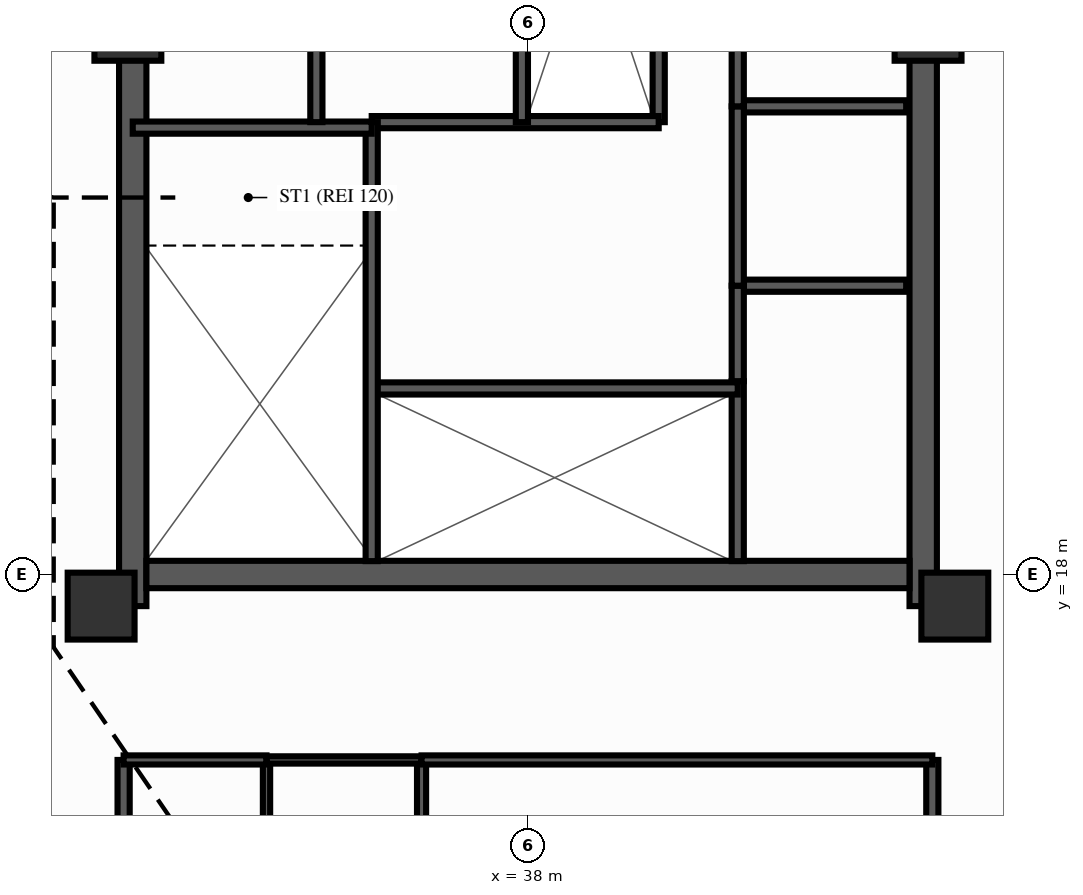
"""IFC4 building model, lengths in metres.
Left out: names, types, materials, properties, quantities, classifications, styles, units other than length and angle.
Written with IfcOpenShell. Run it as: python <this file> out.ifc"""

import sys

from ifc_helpers import new_model, si_unit, direction, frame, frame_2d, origin, origin_2d, place, context, subcontext, project, spatial, rectangle, extrude, source, transform, mapped, element, fill, save


model = new_model("IFC4")
c1 = context("Model", 3, precision=1e-05, world=origin(), true_north=direction((0.0, 1.0)))
c2 = subcontext(c1, "Body", "Model", "MODEL_VIEW")
j1 = project(units=[si_unit("LENGTHUNIT", "METRE"), si_unit("PLANEANGLEUNIT", "RADIAN")], contexts=[c1])
p1 = place(None, origin())
s1 = spatial("IfcSite", under=j1, at=p1, CompositionType="ELEMENT")
p2 = place(p1, origin())
s2 = spatial("IfcBuilding", under=s1, at=p2, CompositionType="ELEMENT")
p3 = place(p2, frame((0.0, 0.0, 148.7)))
s3 = spatial("IfcBuildingStorey", under=s2, at=p3, CompositionType="ELEMENT", Elevation=148.7)
p4 = place(p3, frame((31.5, 17.48, 0.0), z_axis=(0.0, 0.0, 1.0), x_axis=(0.0, 1.0, 0.0)))
e1 = element("IfcWall", 1, at=p4, inside=s3, PredefinedType="SHEAR", context=c2, shape_type="SweptSolid", body=[
    extrude(rectangle(XDim=19.04, YDim=0.45, at=frame_2d((9.52, 0.0))), origin(), (0.0, 0.0, 1.0), 3.5),
])
p5 = place(p4, frame((6.32, 0.0, 0.0)))
e2 = element("IfcOpeningElement", 2, at=p5, cuts=e1, PredefinedType="OPENING", context=c2, shape_type="SweptSolid", body=[
    extrude(rectangle(XDim=1.1, YDim=2.15, at=frame_2d((0.55, 1.075))), frame((0.0, 0.237, 0.0), z_axis=(0.0, -1.0, 0.0), x_axis=(1.0, 0.0, 0.0)), (0.0, 0.0, 1.0), 0.474),
])
p6 = place(p3, frame((44.5, 17.48, 0.0), z_axis=(0.0, 0.0, 1.0), x_axis=(0.0, 1.0, 0.0)))
e3 = element("IfcWall", 3, at=p6, inside=s3, PredefinedType="SHEAR", context=c2, shape_type="SweptSolid", body=[
    extrude(rectangle(XDim=19.04, YDim=0.45, at=frame_2d((9.52, 0.0))), origin(), (0.0, 0.0, 1.0), 3.5),
])
p7 = place(p6, frame((12.67, 0.0, 0.0), z_axis=(0.0, 0.0, 1.0), x_axis=(-1.0, 0.0, 0.0)))
e4 = element("IfcOpeningElement", 4, at=p7, cuts=e3, PredefinedType="OPENING", context=c2, shape_type="SweptSolid", body=[
    extrude(rectangle(XDim=1.1, YDim=2.15, at=frame_2d((0.55, 1.075))), frame((0.0, 0.237, 0.0), z_axis=(0.0, -1.0, 0.0), x_axis=(1.0, 0.0, 0.0)), (0.0, 0.0, 1.0), 0.474),
])
p8 = place(p3, frame((31.725, 18.0, 0.0), z_axis=(0.0, 0.0, 1.0), x_axis=(1.0, 0.0, 0.0)))
e5 = element("IfcWall", 5, at=p8, inside=s3, PredefinedType="SHEAR", context=c2, shape_type="SweptSolid", body=[
    extrude(rectangle(XDim=12.55, YDim=0.45, at=frame_2d((6.275, 0.0))), origin(), (0.0, 0.0, 1.0), 3.5),
])
m1 = source(origin(), c2, "Body", "SweptSolid", [
    extrude(rectangle(XDim=1.1, YDim=1.1, at=origin_2d()), origin(), (0.0, 0.0, 1.0), 3.5),
])
for number, where, z_axis, x_axis in (
    (6, (30.98, 17.48, 0.0), (0.0, 0.0, 1.0), (1.0, 0.0, 0.0)),
    (7, (45.02, 17.48, 0.0), (0.0, 0.0, 1.0), (1.0, 0.0, 0.0)),
    (8, (31.42, 27.0, 0.0), (0.0, 0.0, 1.0), (1.0, 0.0, 0.0)),
    (9, (44.58, 27.0, 0.0), (0.0, 0.0, 1.0), (1.0, 0.0, 0.0)),
):
    element("IfcColumn", number, at=place(p3, frame(where, z_axis=z_axis, x_axis=x_axis)), inside=s3, PredefinedType="COLUMN", context=c2, shape_type="MappedRepresentation", body=[
        mapped(m1, transform((0.0, 0.0, 0.0), scale=1.0)),
    ])
p9 = place(p3, frame((41.55, 22.75, 0.0), z_axis=(0.0, 0.0, 1.0), x_axis=(1.0, 0.0, 0.0)))
e10 = element("IfcWall", 10, at=p9, inside=s3, PredefinedType="PARTITIONING", context=c2, shape_type="SweptSolid", body=[
    extrude(rectangle(XDim=2.67, YDim=0.2, at=frame_2d((1.335, 0.0))), origin(), (0.0, 0.0, 1.0), 3.16),
])
p10 = place(p3, frame((41.55, 25.7, 0.0), z_axis=(0.0, 0.0, 1.0), x_axis=(1.0, 0.0, 0.0)))
e11 = element("IfcWall", 11, at=p10, inside=s3, PredefinedType="PARTITIONING", context=c2, shape_type="SweptSolid", body=[
    extrude(rectangle(XDim=2.67, YDim=0.2, at=frame_2d((1.335, 0.0))), origin(), (0.0, 0.0, 1.0), 2.64),
])
p11 = place(p3, frame((41.45, 18.22, 0.0), z_axis=(0.0, 0.0, 1.0), x_axis=(0.0, 1.0, 0.0)))
e12 = element("IfcWall", 12, at=p11, inside=s3, PredefinedType="PARTITIONING", context=c2, shape_type="SweptSolid", body=[
    extrude(rectangle(XDim=2.96, YDim=0.2, at=frame_2d((1.48, 0.0))), origin(), (0.0, 0.0, 1.0), 3.16),
])
p12 = place(p3, frame((41.45, 21.18, 0.0), z_axis=(0.0, 0.0, 1.0), x_axis=(0.0, 1.0, 0.0)))
e13 = element("IfcWall", 13, at=p12, inside=s3, PredefinedType="PARTITIONING", context=c2, shape_type="SweptSolid", body=[
    extrude(rectangle(XDim=1.57, YDim=0.2, at=frame_2d((0.785, 0.0))), origin(), (0.0, 0.0, 1.0), 3.16),
])
p13 = place(p12, frame((0.38, 0.0, 0.0)))
e14 = element("IfcOpeningElement", 14, at=p13, cuts=e13, PredefinedType="OPENING", context=c2, shape_type="SweptSolid", body=[
    extrude(rectangle(XDim=0.8, YDim=2.05, at=frame_2d((0.4, 1.025))), frame((0.0, 0.112, 0.0), z_axis=(0.0, -1.0, 0.0), x_axis=(1.0, 0.0, 0.0)), (0.0, 0.0, 1.0), 0.224),
])
p14 = place(p3, frame((41.45, 22.75, 0.0), z_axis=(0.0, 0.0, 1.0), x_axis=(0.0, 1.0, 0.0)))
e15 = element("IfcWall", 15, at=p14, inside=s3, PredefinedType="PARTITIONING", context=c2, shape_type="SweptSolid", body=[
    extrude(rectangle(XDim=2.95, YDim=0.2, at=frame_2d((1.475, 0.0))), origin(), (0.0, 0.0, 1.0), 3.16),
])
p15 = place(p14, frame((1.05, 0.0, 0.0)))
e16 = element("IfcOpeningElement", 16, at=p15, cuts=e15, PredefinedType="OPENING", context=c2, shape_type="SweptSolid", body=[
    extrude(rectangle(XDim=0.8, YDim=2.05, at=frame_2d((0.4, 1.025))), frame((0.0, 0.112, 0.0), z_axis=(0.0, -1.0, 0.0), x_axis=(1.0, 0.0, 0.0)), (0.0, 0.0, 1.0), 0.224),
])
p16 = place(p3, frame((41.45, 25.7, 0.0), z_axis=(0.0, 0.0, 1.0), x_axis=(0.0, 1.0, 0.0)))
e17 = element("IfcWall", 17, at=p16, inside=s3, PredefinedType="PARTITIONING", context=c2, shape_type="SweptSolid", body=[
    extrude(rectangle(XDim=2.9, YDim=0.2, at=frame_2d((1.45, 0.0))), origin(), (0.0, 0.0, 1.0), 3.16),
])
p17 = place(p16, frame((1.0, 0.0, 0.0)))
e18 = element("IfcOpeningElement", 18, at=p17, cuts=e17, PredefinedType="OPENING", context=c2, shape_type="SweptSolid", body=[
    extrude(rectangle(XDim=0.9, YDim=2.1, at=frame_2d((0.45, 1.05))), frame((0.0, 0.112, 0.0), z_axis=(0.0, -1.0, 0.0), x_axis=(1.0, 0.0, 0.0)), (0.0, 0.0, 1.0), 0.224),
])
p18 = place(p3, frame((40.15, 25.44, 0.0), z_axis=(0.0, 0.0, 1.0), x_axis=(0.0, 1.0, 0.0)))
e19 = element("IfcWall", 19, at=p18, inside=s3, PredefinedType="PARTITIONING", context=c2, shape_type="SweptSolid", body=[
    extrude(rectangle(XDim=6.36, YDim=0.2, at=frame_2d((3.18, 0.0))), origin(), (0.0, 0.0, 1.0), 3.16),
])
p19 = place(p3, frame((35.43, 21.06, 0.0), z_axis=(0.0, 0.0, 1.0), x_axis=(1.0, 0.0, 0.0)))
e20 = element("IfcWall", 20, at=p19, inside=s3, PredefinedType="PARTITIONING", context=c2, shape_type="SweptSolid", body=[
    extrude(rectangle(XDim=6.02, YDim=0.2, at=frame_2d((3.01, 0.0))), origin(), (0.0, 0.0, 1.0), 3.16),
])
p20 = place(p19, frame((1.0, 0.0, 0.0)))
e21 = element("IfcOpeningElement", 21, at=p20, cuts=e20, PredefinedType="OPENING", context=c2, shape_type="SweptSolid", body=[
    extrude(rectangle(XDim=1.1, YDim=2.15, at=frame_2d((0.55, 1.075))), frame((0.0, 0.112, 0.0), z_axis=(0.0, -1.0, 0.0), x_axis=(1.0, 0.0, 0.0)), (0.0, 0.0, 1.0), 0.224),
])
p21 = place(p19, frame((2.95, 0.0, 0.0)))
e22 = element("IfcOpeningElement", 22, at=p21, cuts=e20, PredefinedType="OPENING", context=c2, shape_type="SweptSolid", body=[
    extrude(rectangle(XDim=1.1, YDim=2.15, at=frame_2d((0.55, 1.075))), frame((0.0, 0.112, 0.0), z_axis=(0.0, -1.0, 0.0), x_axis=(1.0, 0.0, 0.0)), (0.0, 0.0, 1.0), 0.224),
])
p22 = place(p19, frame((4.58, 0.0, 0.0)))
e23 = element("IfcOpeningElement", 23, at=p22, cuts=e20, PredefinedType="OPENING", context=c2, shape_type="SweptSolid", body=[
    extrude(rectangle(XDim=1.2, YDim=2.15, at=frame_2d((0.6, 1.075))), frame((0.0, 0.112, 0.0), z_axis=(0.0, -1.0, 0.0), x_axis=(1.0, 0.0, 0.0)), (0.0, 0.0, 1.0), 0.224),
])
p23 = place(p3, frame((35.43, 25.44, 0.0), z_axis=(0.0, 0.0, 1.0), x_axis=(1.0, 0.0, 0.0)))
e24 = element("IfcWall", 24, at=p23, inside=s3, PredefinedType="PARTITIONING", context=c2, shape_type="SweptSolid", body=[
    extrude(rectangle(XDim=4.72, YDim=0.2, at=frame_2d((2.36, 0.0))), origin(), (0.0, 0.0, 1.0), 3.16),
])
p24 = place(p23, frame((1.25, 0.0, 0.0)))
e25 = element("IfcOpeningElement", 25, at=p24, cuts=e24, PredefinedType="OPENING", context=c2, shape_type="SweptSolid", body=[
    extrude(rectangle(XDim=1.1, YDim=2.15, at=frame_2d((0.55, 1.075))), frame((0.0, 0.112, 0.0), z_axis=(0.0, -1.0, 0.0), x_axis=(1.0, 0.0, 0.0)), (0.0, 0.0, 1.0), 0.224),
])
p25 = place(p3, frame((35.43, 18.22, 0.0), z_axis=(0.0, 0.0, 1.0), x_axis=(0.0, 1.0, 0.0)))
e26 = element("IfcWall", 26, at=p25, inside=s3, PredefinedType="SOLIDWALL", context=c2, shape_type="SweptSolid", body=[
    extrude(rectangle(XDim=7.22, YDim=0.2, at=frame_2d((3.61, 0.0))), origin(), (0.0, 0.0, 1.0), 3.29),
])
p26 = place(p25, frame((6.68, 0.0, 0.0), z_axis=(0.0, 0.0, 1.0), x_axis=(-1.0, 0.0, 0.0)))
e27 = element("IfcOpeningElement", 27, at=p26, cuts=e26, PredefinedType="OPENING", context=c2, shape_type="SweptSolid", body=[
    extrude(rectangle(XDim=1.1, YDim=2.15, at=frame_2d((0.55, 1.075))), frame((0.0, 0.112, 0.0), z_axis=(0.0, -1.0, 0.0), x_axis=(1.0, 0.0, 0.0)), (0.0, 0.0, 1.0), 0.224),
])
p27 = place(p3, frame((31.5, 25.35, 0.0), z_axis=(0.0, 0.0, 1.0), x_axis=(1.0, 0.0, 0.0)))
e28 = element("IfcWall", 28, at=p27, inside=s3, PredefinedType="SOLIDWALL", context=c2, shape_type="SweptSolid", body=[
    extrude(rectangle(XDim=3.93, YDim=0.2, at=frame_2d((1.965, 0.0))), origin(), (0.0, 0.0, 1.0), 3.29),
])
p28 = place(p3, frame((34.52, 25.44, 0.0), z_axis=(0.0, 0.0, 1.0), x_axis=(0.0, 1.0, 0.0)))
e29 = element("IfcWall", 29, at=p28, inside=s3, PredefinedType="PARTITIONING", context=c2, shape_type="SweptSolid", body=[
    extrude(rectangle(XDim=10.34, YDim=0.2, at=frame_2d((5.17, 0.0))), origin(), (0.0, 0.0, 1.0), 3.16),
])
p29 = place(p28, frame((1.15, 0.0, 0.0)))
e30 = element("IfcOpeningElement", 30, at=p29, cuts=e29, PredefinedType="OPENING", context=c2, shape_type="SweptSolid", body=[
    extrude(rectangle(XDim=0.9, YDim=2.1, at=frame_2d((0.45, 1.05))), frame((0.0, 0.112, 0.0), z_axis=(0.0, -1.0, 0.0), x_axis=(1.0, 0.0, 0.0)), (0.0, 0.0, 1.0), 0.224),
])
p30 = place(p28, frame((4.35, 0.0, 0.0)))
e31 = element("IfcOpeningElement", 31, at=p30, cuts=e29, PredefinedType="OPENING", context=c2, shape_type="SweptSolid", body=[
    extrude(rectangle(XDim=0.9, YDim=2.1, at=frame_2d((0.45, 1.05))), frame((0.0, 0.112, 0.0), z_axis=(0.0, -1.0, 0.0), x_axis=(1.0, 0.0, 0.0)), (0.0, 0.0, 1.0), 0.224),
])
p31 = place(p28, frame((7.01, 0.0, 0.0)))
e32 = element("IfcOpeningElement", 32, at=p31, cuts=e29, PredefinedType="OPENING", context=c2, shape_type="SweptSolid", body=[
    extrude(rectangle(XDim=1.0, YDim=2.15, at=frame_2d((0.5, 1.075))), frame((0.0, 0.112, 0.0), z_axis=(0.0, -1.0, 0.0), x_axis=(1.0, 0.0, 0.0)), (0.0, 0.0, 1.0), 0.224),
])
p32 = place(p28, frame((8.76, 0.0, 0.0)))
e33 = element("IfcOpeningElement", 33, at=p32, cuts=e29, PredefinedType="OPENING", context=c2, shape_type="SweptSolid", body=[
    extrude(rectangle(XDim=1.0, YDim=2.15, at=frame_2d((0.5, 1.075))), frame((0.0, 0.112, 0.0), z_axis=(0.0, -1.0, 0.0), x_axis=(1.0, 0.0, 0.0)), (0.0, 0.0, 1.0), 0.224),
])
p33 = place(p3, frame((37.9, 25.44, 0.0), z_axis=(0.0, 0.0, 1.0), x_axis=(0.0, 1.0, 0.0)))
e34 = element("IfcWall", 34, at=p33, inside=s3, PredefinedType="PARTITIONING", context=c2, shape_type="SweptSolid", body=[
    extrude(rectangle(XDim=10.34, YDim=0.2, at=frame_2d((5.17, 0.0))), origin(), (0.0, 0.0, 1.0), 3.16),
])
p34 = place(p33, frame((0.32, 0.0, 0.0)))
e35 = element("IfcOpeningElement", 35, at=p34, cuts=e34, PredefinedType="OPENING", context=c2, shape_type="SweptSolid", body=[
    extrude(rectangle(XDim=1.0, YDim=2.15, at=frame_2d((0.5, 1.075))), frame((0.0, 0.112, 0.0), z_axis=(0.0, -1.0, 0.0), x_axis=(1.0, 0.0, 0.0)), (0.0, 0.0, 1.0), 0.224),
])
p35 = place(p33, frame((1.71, 0.0, 0.0)))
e36 = element("IfcOpeningElement", 36, at=p35, cuts=e34, PredefinedType="OPENING", context=c2, shape_type="SweptSolid", body=[
    extrude(rectangle(XDim=1.0, YDim=2.15, at=frame_2d((0.5, 1.075))), frame((0.0, 0.112, 0.0), z_axis=(0.0, -1.0, 0.0), x_axis=(1.0, 0.0, 0.0)), (0.0, 0.0, 1.0), 0.224),
])
p36 = place(p33, frame((3.51, 0.0, 0.0)))
e37 = element("IfcOpeningElement", 37, at=p36, cuts=e34, PredefinedType="OPENING", context=c2, shape_type="SweptSolid", body=[
    extrude(rectangle(XDim=1.0, YDim=2.15, at=frame_2d((0.5, 1.075))), frame((0.0, 0.112, 0.0), z_axis=(0.0, -1.0, 0.0), x_axis=(1.0, 0.0, 0.0)), (0.0, 0.0, 1.0), 0.224),
])
p37 = place(p33, frame((5.01, 0.0, 0.0)))
e38 = element("IfcOpeningElement", 38, at=p37, cuts=e34, PredefinedType="OPENING", context=c2, shape_type="SweptSolid", body=[
    extrude(rectangle(XDim=1.0, YDim=2.15, at=frame_2d((0.5, 1.075))), frame((0.0, 0.112, 0.0), z_axis=(0.0, -1.0, 0.0), x_axis=(1.0, 0.0, 0.0)), (0.0, 0.0, 1.0), 0.224),
])
p38 = place(p33, frame((6.86, 0.0, 0.0)))
e39 = element("IfcOpeningElement", 39, at=p38, cuts=e34, PredefinedType="OPENING", context=c2, shape_type="SweptSolid", body=[
    extrude(rectangle(XDim=1.0, YDim=2.15, at=frame_2d((0.5, 1.075))), frame((0.0, 0.112, 0.0), z_axis=(0.0, -1.0, 0.0), x_axis=(1.0, 0.0, 0.0)), (0.0, 0.0, 1.0), 0.224),
])
p39 = place(p33, frame((8.71, 0.0, 0.0)))
e40 = element("IfcOpeningElement", 40, at=p39, cuts=e34, PredefinedType="OPENING", context=c2, shape_type="SweptSolid", body=[
    extrude(rectangle(XDim=1.0, YDim=2.15, at=frame_2d((0.5, 1.075))), frame((0.0, 0.112, 0.0), z_axis=(0.0, -1.0, 0.0), x_axis=(1.0, 0.0, 0.0)), (0.0, 0.0, 1.0), 0.224),
])
for number, where, z_axis, x_axis in (
    (41, (31.35, 14.95, 0.0), (0.0, 0.0, 1.0), (0.0, -1.0, 0.0)),
    (42, (44.65, 14.95, 0.0), (0.0, 0.0, 1.0), (0.0, -1.0, 0.0)),
):
    element("IfcWall", number, at=place(p3, frame(where, z_axis=z_axis, x_axis=x_axis)), inside=s3, PredefinedType="PARTITIONING", context=c2, shape_type="SweptSolid", body=[
        extrude(rectangle(XDim=8.8, YDim=0.2, at=frame_2d((4.4, 0.0))), origin(), (0.0, 0.0, 1.0), 2.39),
    ])
p40 = place(p3, frame((33.7, 14.95, 0.0), z_axis=(0.0, 0.0, 1.0), x_axis=(0.0, -1.0, 0.0)))
e43 = element("IfcWall", 43, at=p40, inside=s3, PredefinedType="PARTITIONING", context=c2, shape_type="SweptSolid", body=[
    extrude(rectangle(XDim=3.6, YDim=0.12, at=frame_2d((1.8, 0.0))), origin(), (0.0, 0.0, 1.0), 3.16),
])
p41 = place(p3, frame((36.25, 14.95, 0.0), z_axis=(0.0, 0.0, 1.0), x_axis=(0.0, -1.0, 0.0)))
e44 = element("IfcWall", 44, at=p41, inside=s3, PredefinedType="PARTITIONING", context=c2, shape_type="SweptSolid", body=[
    extrude(rectangle(XDim=3.6, YDim=0.15, at=frame_2d((1.8, 0.0))), origin(), (0.0, 0.0, 1.0), 3.16),
])
p42 = place(p3, frame((31.35, 14.95, 0.0), z_axis=(0.0, 0.0, 1.0), x_axis=(1.0, 0.0, 0.0)))
e45 = element("IfcWall", 45, at=p42, inside=s3, PredefinedType="PARTITIONING", context=c2, shape_type="SweptSolid", body=[
    extrude(rectangle(XDim=2.35, YDim=0.15, at=frame_2d((1.175, 0.0))), origin(), (0.0, 0.0, 1.0), 3.16),
])
p43 = place(p42, frame((0.725, 0.0, 0.0)))
e46 = element("IfcOpeningElement", 46, at=p43, cuts=e45, PredefinedType="OPENING", context=c2, shape_type="SweptSolid", body=[
    extrude(rectangle(XDim=0.9, YDim=2.1, at=frame_2d((0.45, 1.05))), frame((0.0, 0.087, 0.0), z_axis=(0.0, -1.0, 0.0), x_axis=(1.0, 0.0, 0.0)), (0.0, 0.0, 1.0), 0.174),
])
p44 = place(p3, frame((33.7, 14.95, 0.0), z_axis=(0.0, 0.0, 1.0), x_axis=(1.0, 0.0, 0.0)))
e47 = element("IfcWall", 47, at=p44, inside=s3, PredefinedType="PARTITIONING", context=c2, shape_type="SweptSolid", body=[
    extrude(rectangle(XDim=2.55, YDim=0.12, at=frame_2d((1.275, 0.0))), origin(), (0.0, 0.0, 1.0), 3.16),
])
p45 = place(p44, frame((0.775, 0.0, 0.0)))
e48 = element("IfcOpeningElement", 48, at=p45, cuts=e47, PredefinedType="OPENING", context=c2, shape_type="SweptSolid", body=[
    extrude(rectangle(XDim=1.0, YDim=2.1, at=frame_2d((0.5, 1.05))), frame((0.0, 0.072, 0.0), z_axis=(0.0, -1.0, 0.0), x_axis=(1.0, 0.0, 0.0)), (0.0, 0.0, 1.0), 0.144),
])
p46 = place(p3, frame((36.25, 14.95, 0.0), z_axis=(0.0, 0.0, 1.0), x_axis=(1.0, 0.0, 0.0)))
e49 = element("IfcWall", 49, at=p46, inside=s3, PredefinedType="PARTITIONING", context=c2, shape_type="SweptSolid", body=[
    extrude(rectangle(XDim=8.4, YDim=0.15, at=frame_2d((4.2, 0.0))), origin(), (0.0, 0.0, 1.0), 3.16),
])
p47 = place(p46, frame((3.367, 0.0, 0.0)))
e50 = element("IfcOpeningElement", 50, at=p47, cuts=e49, PredefinedType="OPENING", context=c2, shape_type="SweptSolid", body=[
    extrude(rectangle(XDim=1.1, YDim=2.15, at=frame_2d((0.55, 1.075))), frame((0.0, 0.087, 0.0), z_axis=(0.0, -1.0, 0.0), x_axis=(1.0, 0.0, 0.0)), (0.0, 0.0, 1.0), 0.174),
])
m2 = source(origin(), c2, "Body", "SweptSolid", [
    extrude(rectangle(XDim=1.1, YDim=2.15, at=frame_2d((0.55, 1.075))), frame((0.0, 0.025, 0.0), z_axis=(0.0, -1.0, 0.0), x_axis=(1.0, 0.0, 0.0)), (0.0, 0.0, 1.0), 0.05),
])
p48 = place(p5, origin())
e51 = element("IfcDoor", 51, at=p48, inside=s3, OperationType="SINGLE_SWING_LEFT", PredefinedType="DOOR", context=c2, shape_type="MappedRepresentation", body=[
    mapped(m2, transform((0.0, 0.0, 0.0), scale=1.0)),
])
fill(e2, e51)
m3 = source(origin(), c2, "Body", "SweptSolid", [
    extrude(rectangle(XDim=0.8, YDim=2.05, at=frame_2d((0.4, 1.025))), frame((0.0, 0.025, 0.0), z_axis=(0.0, -1.0, 0.0), x_axis=(1.0, 0.0, 0.0)), (0.0, 0.0, 1.0), 0.05),
])
p49 = place(p13, origin())
e52 = element("IfcDoor", 52, at=p49, inside=s3, OperationType="SINGLE_SWING_LEFT", PredefinedType="DOOR", context=c2, shape_type="MappedRepresentation", body=[
    mapped(m3, transform((0.0, 0.0, 0.0), scale=1.0)),
])
fill(e14, e52)
p50 = place(p15, origin())
e53 = element("IfcDoor", 53, at=p50, inside=s3, OperationType="SINGLE_SWING_RIGHT", PredefinedType="DOOR", context=c2, shape_type="MappedRepresentation", body=[
    mapped(m3, transform((0.0, 0.0, 0.0), scale=1.0)),
])
fill(e16, e53)
p51 = place(p20, origin())
e54 = element("IfcDoor", 54, at=p51, inside=s3, OperationType="DOUBLE_DOOR_SLIDING", PredefinedType="DOOR", context=c2, shape_type="MappedRepresentation", body=[
    mapped(m2, transform((0.0, 0.0, 0.0), scale=1.0)),
])
fill(e21, e54)
p52 = place(p21, origin())
e55 = element("IfcDoor", 55, at=p52, inside=s3, OperationType="DOUBLE_DOOR_SLIDING", PredefinedType="DOOR", context=c2, shape_type="MappedRepresentation", body=[
    mapped(m2, transform((0.0, 0.0, 0.0), scale=1.0)),
])
fill(e22, e55)
m4 = source(origin(), c2, "Body", "SweptSolid", [
    extrude(rectangle(XDim=1.2, YDim=2.15, at=frame_2d((0.6, 1.075))), frame((0.0, 0.025, 0.0), z_axis=(0.0, -1.0, 0.0), x_axis=(1.0, 0.0, 0.0)), (0.0, 0.0, 1.0), 0.05),
])
p53 = place(p22, origin())
e56 = element("IfcDoor", 56, at=p53, inside=s3, OperationType="DOUBLE_DOOR_SLIDING", PredefinedType="DOOR", context=c2, shape_type="MappedRepresentation", body=[
    mapped(m4, transform((0.0, 0.0, 0.0), scale=1.0)),
])
fill(e23, e56)
p54 = place(p24, origin())
e57 = element("IfcDoor", 57, at=p54, inside=s3, OperationType="SINGLE_SWING_RIGHT", PredefinedType="DOOR", context=c2, shape_type="MappedRepresentation", body=[
    mapped(m2, transform((0.0, 0.0, 0.0), scale=1.0)),
])
fill(e25, e57)
p55 = place(p26, origin())
e58 = element("IfcDoor", 58, at=p55, inside=s3, OperationType="SINGLE_SWING_LEFT", PredefinedType="DOOR", context=c2, shape_type="MappedRepresentation", body=[
    mapped(m2, transform((0.0, 0.0, 0.0), scale=1.0)),
])
fill(e27, e58)
m5 = source(origin(), c2, "Body", "SweptSolid", [
    extrude(rectangle(XDim=0.9, YDim=2.1, at=frame_2d((0.45, 1.05))), frame((0.0, 0.025, 0.0), z_axis=(0.0, -1.0, 0.0), x_axis=(1.0, 0.0, 0.0)), (0.0, 0.0, 1.0), 0.05),
])
p56 = place(p29, origin())
e59 = element("IfcDoor", 59, at=p56, inside=s3, OperationType="SINGLE_SWING_RIGHT", PredefinedType="DOOR", context=c2, shape_type="MappedRepresentation", body=[
    mapped(m5, transform((0.0, 0.0, 0.0), scale=1.0)),
])
fill(e30, e59)
m6 = source(origin(), c2, "Body", "SweptSolid", [
    extrude(rectangle(XDim=1.0, YDim=2.15, at=frame_2d((0.5, 1.075))), frame((0.0, 0.025, 0.0), z_axis=(0.0, -1.0, 0.0), x_axis=(1.0, 0.0, 0.0)), (0.0, 0.0, 1.0), 0.05),
])
p57 = place(p34, origin())
e60 = element("IfcDoor", 60, at=p57, inside=s3, OperationType="DOUBLE_DOOR_SLIDING", PredefinedType="DOOR", context=c2, shape_type="MappedRepresentation", body=[
    mapped(m6, transform((0.0, 0.0, 0.0), scale=1.0)),
])
fill(e35, e60)
p58 = place(p43, origin())
e61 = element("IfcDoor", 61, at=p58, inside=s3, OperationType="SINGLE_SWING_LEFT", PredefinedType="DOOR", context=c2, shape_type="MappedRepresentation", body=[
    mapped(m5, transform((0.0, 0.0, 0.0), scale=1.0)),
])
fill(e46, e61)
m7 = source(origin(), c2, "Body", "SweptSolid", [
    extrude(rectangle(XDim=1.0, YDim=2.1, at=frame_2d((0.5, 1.05))), frame((0.0, 0.025, 0.0), z_axis=(0.0, -1.0, 0.0), x_axis=(1.0, 0.0, 0.0)), (0.0, 0.0, 1.0), 0.05),
])
p59 = place(p45, origin())
e62 = element("IfcDoor", 62, at=p59, inside=s3, OperationType="SINGLE_SWING_RIGHT", PredefinedType="DOOR", context=c2, shape_type="MappedRepresentation", body=[
    mapped(m7, transform((0.0, 0.0, 0.0), scale=1.0)),
])
fill(e48, e62)
p60 = place(p47, origin())
e63 = element("IfcDoor", 63, at=p60, inside=s3, OperationType="SINGLE_SWING_LEFT", PredefinedType="DOOR", context=c2, shape_type="MappedRepresentation", body=[
    mapped(m2, transform((0.0, 0.0, 0.0), scale=1.0)),
])
fill(e50, e63)
save(model, sys.argv[1])
